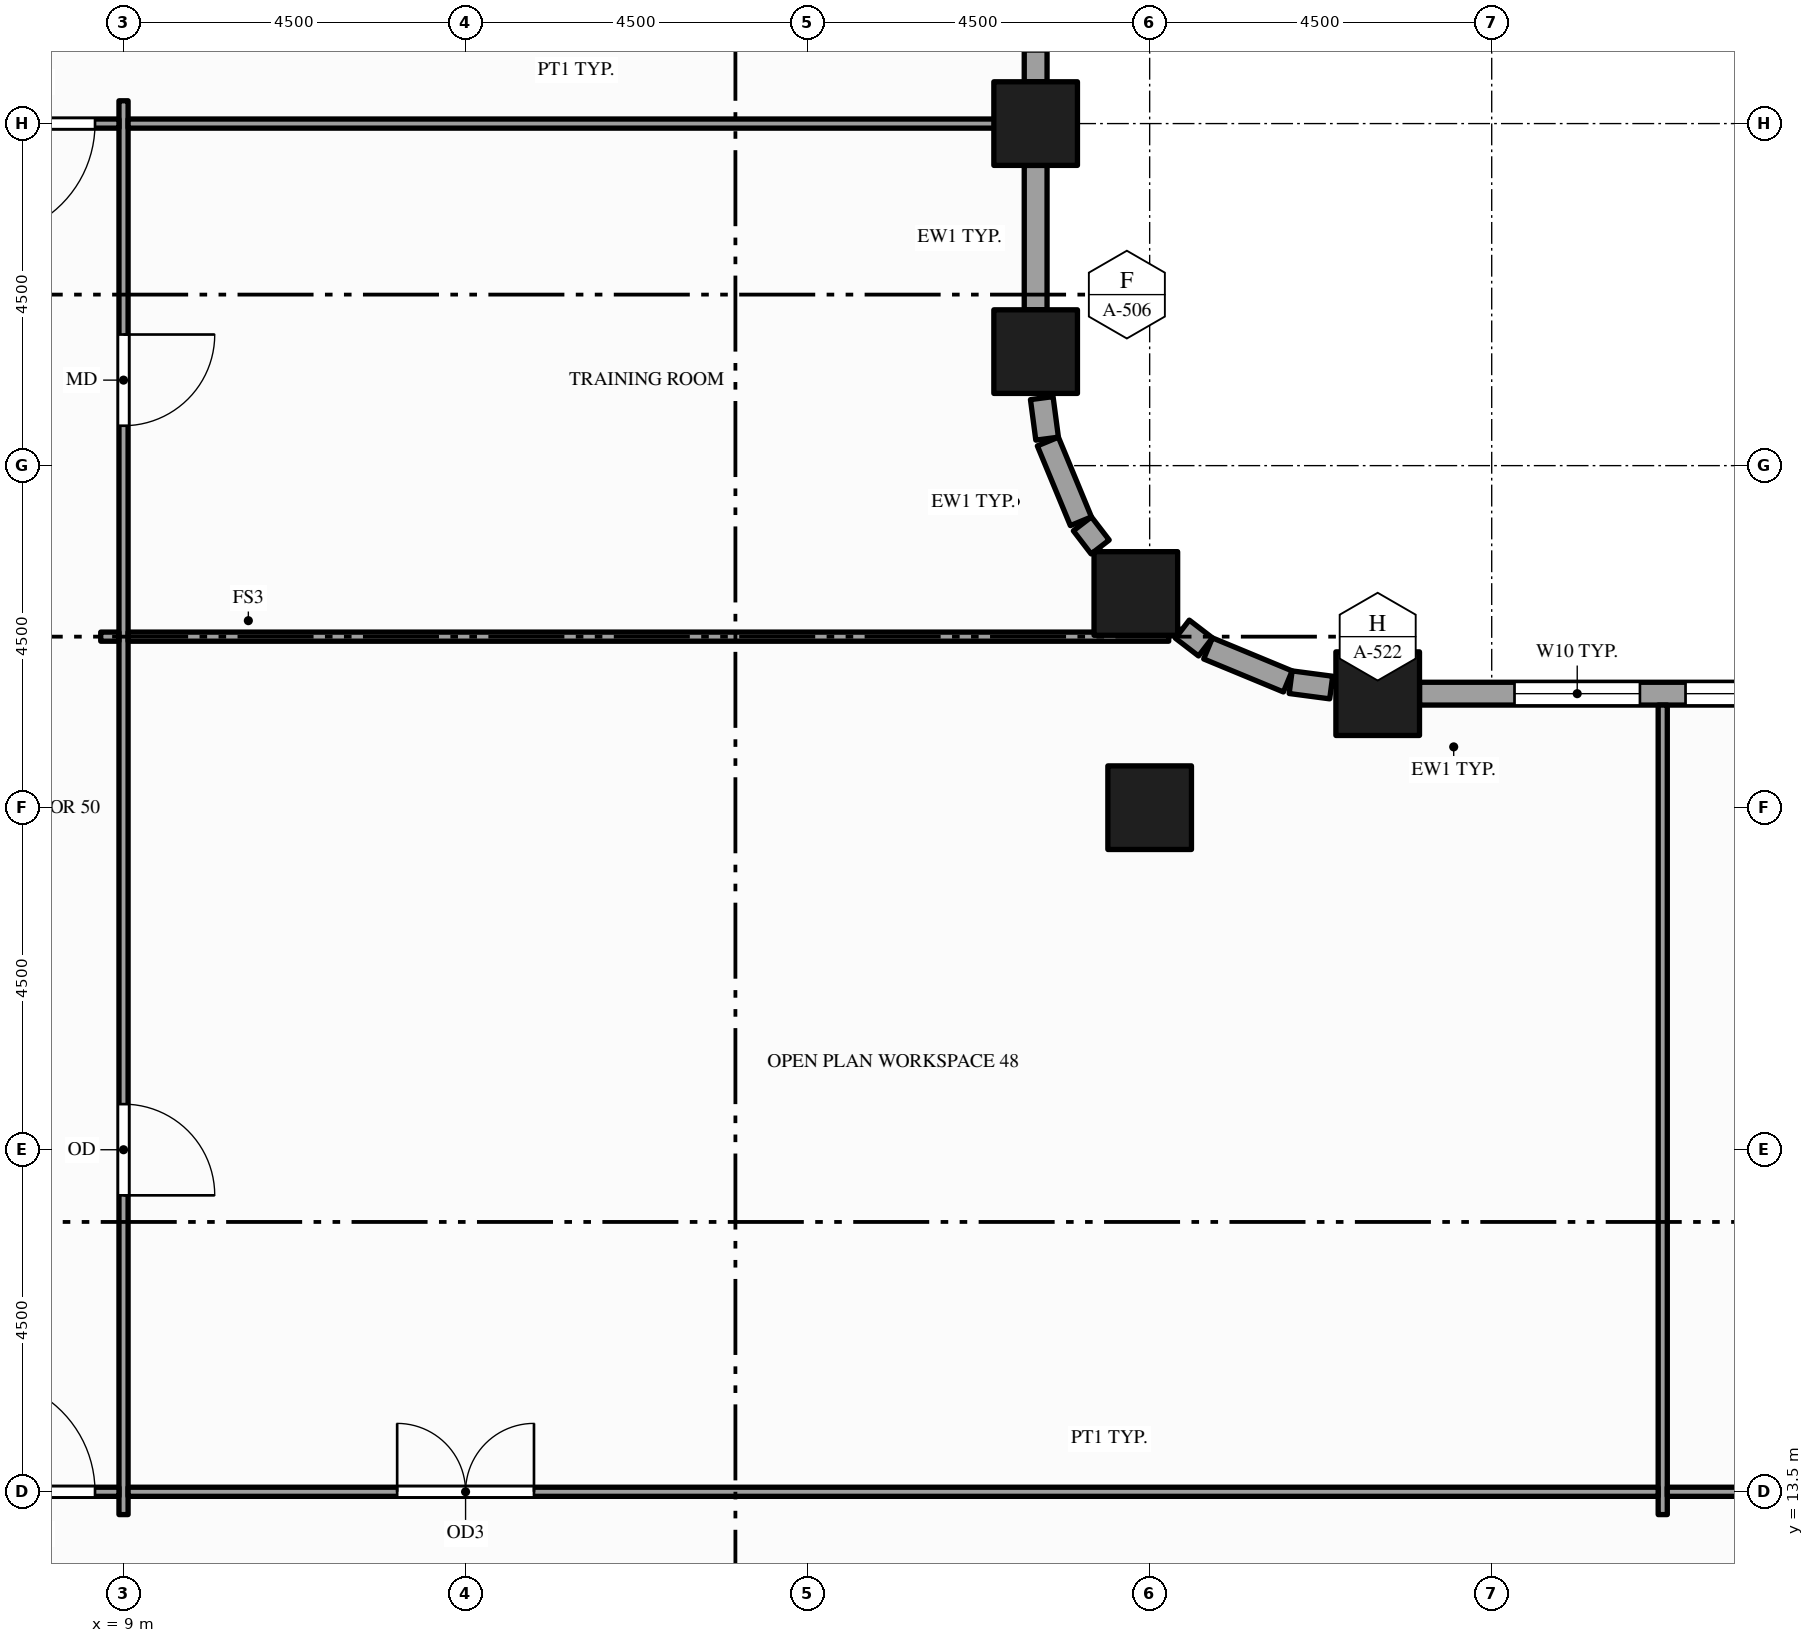
"""IFC4 building model, lengths in metres.
Left out: names, types, materials, properties, quantities, classifications, styles, units other than length and angle.
Written with IfcOpenShell. Run it as: python <this file> out.ifc"""

import sys

from ifc_helpers import new_model, si_unit, direction, frame, frame_2d, origin, origin_2d, place, context, subcontext, project, spatial, rectangle, hollow_rectangle, extrude, element, fill, save


model = new_model("IFC4")
c1 = context("Model", 3, precision=1e-05, world=origin(), true_north=direction((0.0, 1.0)))
c2 = subcontext(c1, "Body", "Model", "MODEL_VIEW")
j1 = project(units=[si_unit("LENGTHUNIT", "METRE"), si_unit("PLANEANGLEUNIT", "RADIAN")], contexts=[c1])
p1 = place(None, origin())
s1 = spatial("IfcSite", under=j1, at=p1, CompositionType="ELEMENT")
p2 = place(p1, origin())
s2 = spatial("IfcBuilding", under=s1, at=p2, CompositionType="ELEMENT")
p3 = place(p2, frame((0.0, 0.0, 45.0)))
s3 = spatial("IfcBuildingStorey", under=s2, at=p3, CompositionType="ELEMENT", Elevation=45.0)
for number, where, z_axis, x_axis in (
    (1, (21.0, 28.5, -0.15), (0.0, 0.0, 1.0), (1.0, 0.0, 0.0)),
    (2, (21.0, 31.5, -0.15), (0.0, 0.0, 1.0), (1.0, 0.0, 0.0)),
    (3, (22.318, 25.318, -0.15), (0.0, 0.0, 1.0), (1.0, 0.0, 0.0)),
    (4, (22.5, 22.5, -0.15), (0.0, 0.0, 1.0), (1.0, 0.0, 0.0)),
    (5, (25.5, 24.0, -0.15), (0.0, 0.0, 1.0), (1.0, 0.0, 0.0)),
):
    element("IfcColumn", number, at=place(p3, frame(where, z_axis=z_axis, x_axis=x_axis)), inside=s3, PredefinedType="COLUMN", context=c2, shape_type="SweptSolid", body=[
        extrude(hollow_rectangle(XDim=1.1, YDim=1.1, WallThickness=0.06, at=origin_2d()), origin(), (0.0, 0.0, 1.0), 4.0),
    ])
p4 = place(p3, frame((30.95, 24.0, 0.0), z_axis=(0.0, 0.0, 1.0), x_axis=(-1.0, 0.0, 0.0)))
e6 = element("IfcWall", 6, at=p4, inside=s3, PredefinedType="STANDARD", context=c2, shape_type="SweptSolid", body=[
    extrude(rectangle(XDim=4.9, YDim=0.3, at=frame_2d((2.45, 0.0))), origin(), (0.0, 0.0, 1.0), 3.144),
])
p5 = place(p4, frame((0.4, 0.0, 0.9)))
e7 = element("IfcOpeningElement", 7, at=p5, cuts=e6, PredefinedType="OPENING", context=c2, shape_type="SweptSolid", body=[
    extrude(rectangle(XDim=1.0, YDim=2.0, at=frame_2d((0.5, 1.0))), frame((0.0, 0.16, 0.0), z_axis=(0.0, -1.0, 0.0), x_axis=(1.0, 0.0, 0.0)), (0.0, 0.0, 1.0), 0.32),
])
p6 = place(p4, frame((2.0, 0.0, 0.9)))
e8 = element("IfcOpeningElement", 8, at=p6, cuts=e6, PredefinedType="OPENING", context=c2, shape_type="SweptSolid", body=[
    extrude(rectangle(XDim=1.65, YDim=2.0, at=frame_2d((0.825, 1.0))), frame((0.0, 0.16, 0.0), z_axis=(0.0, -1.0, 0.0), x_axis=(1.0, 0.0, 0.0)), (0.0, 0.0, 1.0), 0.32),
])
p7 = place(p3, frame((24.888, 24.081, 0.0), z_axis=(0.0, 0.0, 1.0), x_axis=(-0.991417173479, 0.130736330569, 0.0)))
e9 = element("IfcWall", 9, at=p7, inside=s3, PredefinedType="STANDARD", context=c2, shape_type="SweptSolid", body=[
    extrude(rectangle(XDim=0.538, YDim=0.3, at=frame_2d((0.269, 0.0))), origin(), (0.0, 0.0, 1.0), 2.938),
])
p8 = place(p3, frame((24.317, 24.161, 0.0), z_axis=(0.0, 0.0, 1.0), x_axis=(-0.923914616768, 0.382598720491, 0.0)))
e10 = element("IfcWall", 10, at=p8, inside=s3, PredefinedType="STANDARD", context=c2, shape_type="SweptSolid", body=[
    extrude(rectangle(XDim=1.135, YDim=0.3, at=frame_2d((0.568, 0.0))), origin(), (0.0, 0.0, 1.0), 3.144),
])
for number, where, z_axis, x_axis in (
    (11, (23.234, 24.615, 0.0), (0.0, 0.0, 1.0), (-0.794, 0.609, 0.0)),
    (12, (21.849, 25.93, 0.0), (0.0, 0.0, 1.0), (-0.609, 0.794, 0.0)),
):
    element("IfcWall", number, at=place(p3, frame(where, z_axis=z_axis, x_axis=x_axis)), inside=s3, PredefinedType="STANDARD", context=c2, shape_type="SweptSolid", body=[
        extrude(rectangle(XDim=0.384, YDim=0.3, at=frame_2d((0.192, 0.0))), origin(), (0.0, 0.0, 1.0), 3.144),
    ])
p9 = place(p3, frame((21.595, 26.268, 0.0), z_axis=(0.0, 0.0, 1.0), x_axis=(-0.382598720491, 0.923914616768, 0.0)))
e13 = element("IfcWall", 13, at=p9, inside=s3, PredefinedType="STANDARD", context=c2, shape_type="SweptSolid", body=[
    extrude(rectangle(XDim=1.135, YDim=0.3, at=frame_2d((0.568, 0.0))), origin(), (0.0, 0.0, 1.0), 3.144),
])
p10 = place(p3, frame((21.151, 27.355, 0.0), z_axis=(0.0, 0.0, 1.0), x_axis=(-0.130736330569, 0.991417173479, 0.0)))
e14 = element("IfcWall", 14, at=p10, inside=s3, PredefinedType="STANDARD", context=c2, shape_type="SweptSolid", body=[
    extrude(rectangle(XDim=0.538, YDim=0.3, at=frame_2d((0.269, 0.0))), origin(), (0.0, 0.0, 1.0), 3.144),
])
p11 = place(p3, frame((21.0, 29.05, 0.0), z_axis=(0.0, 0.0, 1.0), x_axis=(0.0, 1.0, 0.0)))
e15 = element("IfcWall", 15, at=p11, inside=s3, PredefinedType="STANDARD", context=c2, shape_type="SweptSolid", body=[
    extrude(rectangle(XDim=1.9, YDim=0.3, at=frame_2d((0.95, 0.0))), origin(), (0.0, 0.0, 1.0), 3.144),
])
p12 = place(p3, frame((21.0, 32.05, 0.0), z_axis=(0.0, 0.0, 1.0), x_axis=(0.0, 1.0, 0.0)))
e16 = element("IfcWall", 16, at=p12, inside=s3, PredefinedType="STANDARD", context=c2, shape_type="SweptSolid", body=[
    extrude(rectangle(XDim=3.95, YDim=0.3, at=frame_2d((1.975, 0.0))), origin(), (0.0, 0.0, 1.0), 3.144),
])
p13 = place(p12, frame((0.4, 0.0, 0.9)))
e17 = element("IfcOpeningElement", 17, at=p13, cuts=e16, PredefinedType="OPENING", context=c2, shape_type="SweptSolid", body=[
    extrude(rectangle(XDim=1.0, YDim=2.0, at=frame_2d((0.5, 1.0))), frame((0.0, 0.16, 0.0), z_axis=(0.0, -1.0, 0.0), x_axis=(1.0, 0.0, 0.0)), (0.0, 0.0, 1.0), 0.32),
])
p14 = place(p12, frame((2.0, 0.0, 0.9)))
e18 = element("IfcOpeningElement", 18, at=p14, cuts=e16, PredefinedType="OPENING", context=c2, shape_type="SweptSolid", body=[
    extrude(rectangle(XDim=1.55, YDim=2.0, at=frame_2d((0.775, 1.0))), frame((0.0, 0.16, 0.0), z_axis=(0.0, -1.0, 0.0), x_axis=(1.0, 0.0, 0.0)), (0.0, 0.0, 1.0), 0.32),
])
p15 = place(p3, frame((9.0, 13.2, 0.0), z_axis=(0.0, 0.0, 1.0), x_axis=(0.0, 1.0, 0.0)))
e19 = element("IfcWall", 19, at=p15, inside=s3, PredefinedType="PARTITIONING", context=c2, shape_type="SweptSolid", body=[
    extrude(rectangle(XDim=18.6, YDim=0.12, at=frame_2d((9.3, 0.0))), origin(), (0.0, 0.0, 1.0), 2.6),
])
p16 = place(p15, frame((14.325, 0.0, 0.0)))
e20 = element("IfcOpeningElement", 20, at=p16, cuts=e19, PredefinedType="OPENING", context=c2, shape_type="SweptSolid", body=[
    extrude(rectangle(XDim=1.2, YDim=2.1, at=frame_2d((0.6, 1.05))), frame((0.0, 0.07, 0.0), z_axis=(0.0, -1.0, 0.0), x_axis=(1.0, 0.0, 0.0)), (0.0, 0.0, 1.0), 0.14),
])
p17 = place(p15, frame((4.2, 0.0, 0.0)))
e21 = element("IfcOpeningElement", 21, at=p17, cuts=e19, PredefinedType="OPENING", context=c2, shape_type="SweptSolid", body=[
    extrude(rectangle(XDim=1.2, YDim=2.1, at=frame_2d((0.6, 1.05))), frame((0.0, 0.07, 0.0), z_axis=(0.0, -1.0, 0.0), x_axis=(1.0, 0.0, 0.0)), (0.0, 0.0, 1.0), 0.14),
])
p18 = place(p3, frame((29.25, 13.2, 0.0), z_axis=(0.0, 0.0, 1.0), x_axis=(0.0, 1.0, 0.0)))
e22 = element("IfcWall", 22, at=p18, inside=s3, PredefinedType="PARTITIONING", context=c2, shape_type="SweptSolid", body=[
    extrude(rectangle(XDim=10.65, YDim=0.12, at=frame_2d((5.325, 0.0))), origin(), (0.0, 0.0, 1.0), 2.938),
])
p19 = place(p3, frame((6.81, 13.5, 0.0), z_axis=(0.0, 0.0, 1.0), x_axis=(1.0, 0.0, 0.0)))
e23 = element("IfcWall", 23, at=p19, inside=s3, PredefinedType="PARTITIONING", context=c2, shape_type="SweptSolid", body=[
    extrude(rectangle(XDim=2.13, YDim=0.12, at=frame_2d((1.065, 0.0))), origin(), (0.0, 0.0, 1.0), 2.938),
])
p20 = place(p19, frame((0.315, 0.0, 0.0)))
e24 = element("IfcOpeningElement", 24, at=p20, cuts=e23, PredefinedType="OPENING", context=c2, shape_type="SweptSolid", body=[
    extrude(rectangle(XDim=1.5, YDim=2.1, at=frame_2d((0.75, 1.05))), frame((0.0, 0.07, 0.0), z_axis=(0.0, -1.0, 0.0), x_axis=(1.0, 0.0, 0.0)), (0.0, 0.0, 1.0), 0.14),
])
p21 = place(p3, frame((9.06, 13.5, 0.0), z_axis=(0.0, 0.0, 1.0), x_axis=(1.0, 0.0, 0.0)))
e25 = element("IfcWall", 25, at=p21, inside=s3, PredefinedType="PARTITIONING", context=c2, shape_type="SweptSolid", body=[
    extrude(rectangle(XDim=20.13, YDim=0.12, at=frame_2d((10.065, 0.0))), origin(), (0.0, 0.0, 1.0), 2.938),
])
p22 = place(p21, frame((3.54, 0.0, 0.0)))
e26 = element("IfcOpeningElement", 26, at=p22, cuts=e25, PredefinedType="OPENING", context=c2, shape_type="SweptSolid", body=[
    extrude(rectangle(XDim=1.8, YDim=2.1, at=frame_2d((0.9, 1.05))), frame((0.0, 0.07, 0.0), z_axis=(0.0, -1.0, 0.0), x_axis=(1.0, 0.0, 0.0)), (0.0, 0.0, 1.0), 0.14),
])
p23 = place(p3, frame((29.31, 13.5, 0.0), z_axis=(0.0, 0.0, 1.0), x_axis=(1.0, 0.0, 0.0)))
e27 = element("IfcWall", 27, at=p23, inside=s3, PredefinedType="PARTITIONING", context=c2, shape_type="SweptSolid", body=[
    extrude(rectangle(XDim=8.88, YDim=0.12, at=frame_2d((4.44, 0.0))), origin(), (0.0, 0.0, 1.0), 2.938),
])
p24 = place(p23, frame((3.84, 0.0, 0.0)))
e28 = element("IfcOpeningElement", 28, at=p24, cuts=e27, PredefinedType="OPENING", context=c2, shape_type="SweptSolid", body=[
    extrude(rectangle(XDim=1.2, YDim=2.1, at=frame_2d((0.6, 1.05))), frame((0.0, 0.07, 0.0), z_axis=(0.0, -1.0, 0.0), x_axis=(1.0, 0.0, 0.0)), (0.0, 0.0, 1.0), 0.14),
])
p25 = place(p3, frame((8.7, 24.75, 0.0), z_axis=(0.0, 0.0, 1.0), x_axis=(1.0, 0.0, 0.0)))
e29 = element("IfcWall", 29, at=p25, inside=s3, PredefinedType="PARTITIONING", context=c2, shape_type="SweptSolid", body=[
    extrude(rectangle(XDim=0.24, YDim=0.12, at=frame_2d((0.12, 0.0))), origin(), (0.0, 0.0, 1.0), 2.938),
])
p26 = place(p3, frame((9.06, 24.75, 0.0), z_axis=(0.0, 0.0, 1.0), x_axis=(1.0, 0.0, 0.0)))
e30 = element("IfcWall", 30, at=p26, inside=s3, PredefinedType="PARTITIONING", context=c2, shape_type="SweptSolid", body=[
    extrude(rectangle(XDim=13.69, YDim=0.12, at=frame_2d((6.845, 0.0))), origin(), (0.0, 0.0, 1.0), 2.938),
])
p27 = place(p3, frame((6.81, 31.5, 0.0), z_axis=(0.0, 0.0, 1.0), x_axis=(1.0, 0.0, 0.0)))
e31 = element("IfcWall", 31, at=p27, inside=s3, PredefinedType="PARTITIONING", context=c2, shape_type="SweptSolid", body=[
    extrude(rectangle(XDim=2.13, YDim=0.12, at=frame_2d((1.065, 0.0))), origin(), (0.0, 0.0, 1.0), 2.938),
])
p28 = place(p27, frame((0.315, 0.0, 0.0)))
e32 = element("IfcOpeningElement", 32, at=p28, cuts=e31, PredefinedType="OPENING", context=c2, shape_type="SweptSolid", body=[
    extrude(rectangle(XDim=1.5, YDim=2.1, at=frame_2d((0.75, 1.05))), frame((0.0, 0.07, 0.0), z_axis=(0.0, -1.0, 0.0), x_axis=(1.0, 0.0, 0.0)), (0.0, 0.0, 1.0), 0.14),
])
p29 = place(p3, frame((9.06, 31.5, 0.0), z_axis=(0.0, 0.0, 1.0), x_axis=(1.0, 0.0, 0.0)))
e33 = element("IfcWall", 33, at=p29, inside=s3, PredefinedType="PARTITIONING", context=c2, shape_type="SweptSolid", body=[
    extrude(rectangle(XDim=11.79, YDim=0.12, at=frame_2d((5.895, 0.0))), origin(), (0.0, 0.0, 1.0), 2.938),
])
p30 = place(p5, origin())
e34 = element("IfcWindow", 34, at=p30, inside=s3, PartitioningType="SINGLE_PANEL", PredefinedType="WINDOW", context=c2, shape_type="SweptSolid", body=[
    extrude(rectangle(XDim=1.0, YDim=2.0, at=frame_2d((0.5, 1.0))), frame((0.0, 0.03, 0.0), z_axis=(0.0, -1.0, 0.0), x_axis=(1.0, 0.0, 0.0)), (0.0, 0.0, 1.0), 0.06),
])
fill(e7, e34)
p31 = place(p6, origin())
e35 = element("IfcWindow", 35, at=p31, inside=s3, PartitioningType="SINGLE_PANEL", PredefinedType="WINDOW", context=c2, shape_type="SweptSolid", body=[
    extrude(rectangle(XDim=1.65, YDim=2.0, at=frame_2d((0.825, 1.0))), frame((0.0, 0.03, 0.0), z_axis=(0.0, -1.0, 0.0), x_axis=(1.0, 0.0, 0.0)), (0.0, 0.0, 1.0), 0.06),
])
fill(e8, e35)
p32 = place(p22, origin())
e36 = element("IfcDoor", 36, at=p32, inside=s3, OperationType="DOUBLE_DOOR_SINGLE_SWING", PredefinedType="DOOR", context=c2, shape_type="SweptSolid", body=[
    extrude(rectangle(XDim=1.8, YDim=2.1, at=frame_2d((0.9, 1.05))), frame((0.0, 0.025, 0.0), z_axis=(0.0, -1.0, 0.0), x_axis=(1.0, 0.0, 0.0)), (0.0, 0.0, 1.0), 0.05),
])
fill(e26, e36)
p33 = place(p20, origin())
e37 = element("IfcDoor", 37, at=p33, inside=s3, OperationType="SINGLE_SWING_LEFT", PredefinedType="DOOR", context=c2, shape_type="SweptSolid", body=[
    extrude(rectangle(XDim=1.5, YDim=2.1, at=frame_2d((0.75, 1.05))), frame((0.0, 0.025, 0.0), z_axis=(0.0, -1.0, 0.0), x_axis=(1.0, 0.0, 0.0)), (0.0, 0.0, 1.0), 0.05),
])
fill(e24, e37)
p34 = place(p28, origin())
e38 = element("IfcDoor", 38, at=p34, inside=s3, OperationType="SINGLE_SWING_LEFT", PredefinedType="DOOR", context=c2, shape_type="SweptSolid", body=[
    extrude(rectangle(XDim=1.5, YDim=2.1, at=frame_2d((0.75, 1.05))), frame((0.0, 0.025, 0.0), z_axis=(0.0, -1.0, 0.0), x_axis=(1.0, 0.0, 0.0)), (0.0, 0.0, 1.0), 0.05),
])
fill(e32, e38)
p35 = place(p16, origin())
e39 = element("IfcDoor", 39, at=p35, inside=s3, OperationType="SINGLE_SWING_RIGHT", PredefinedType="DOOR", context=c2, shape_type="SweptSolid", body=[
    extrude(rectangle(XDim=1.2, YDim=2.1, at=frame_2d((0.6, 1.05))), frame((0.0, 0.025, 0.0), z_axis=(0.0, -1.0, 0.0), x_axis=(1.0, 0.0, 0.0)), (0.0, 0.0, 1.0), 0.05),
])
fill(e20, e39)
p36 = place(p17, origin())
e40 = element("IfcDoor", 40, at=p36, inside=s3, OperationType="SINGLE_SWING_LEFT", PredefinedType="DOOR", context=c2, shape_type="SweptSolid", body=[
    extrude(rectangle(XDim=1.2, YDim=2.1, at=frame_2d((0.6, 1.05))), frame((0.0, 0.025, 0.0), z_axis=(0.0, -1.0, 0.0), x_axis=(1.0, 0.0, 0.0)), (0.0, 0.0, 1.0), 0.05),
])
fill(e21, e40)
save(model, sys.argv[1])
